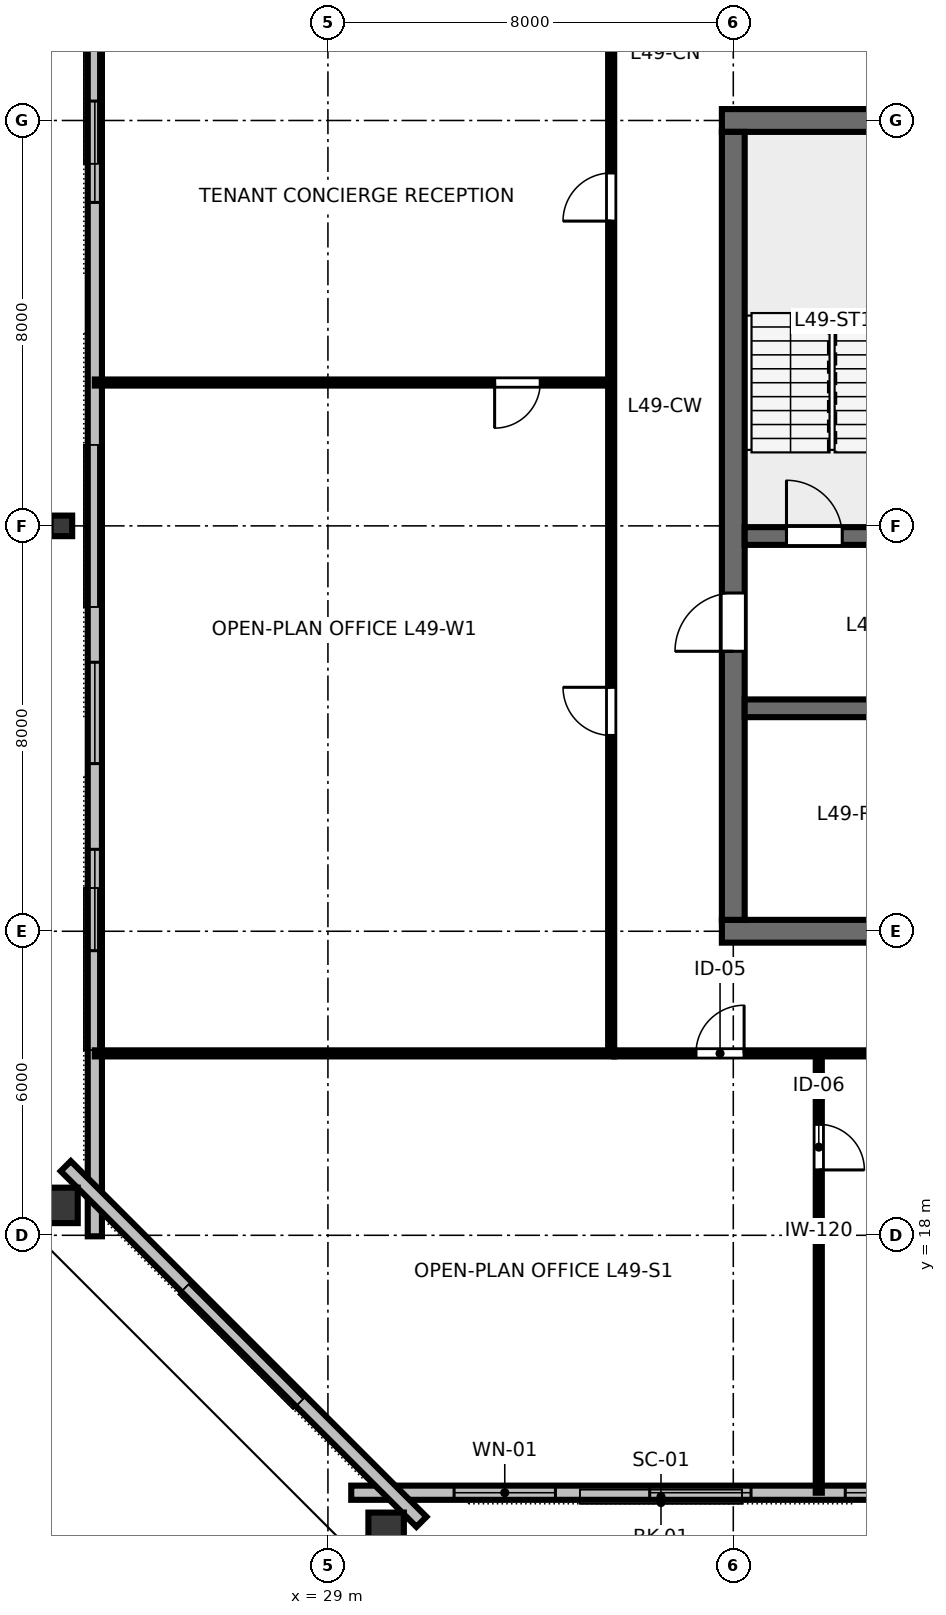
"""IFC4 building model, lengths in metres.
Left out: names, types, materials, properties, quantities, classifications, styles, units other than length and angle.
Written with IfcOpenShell. Run it as: python <this file> out.ifc"""

import sys

from ifc_helpers import new_model, si_unit, direction, frame, frame_2d, origin, origin_2d, place, context, subcontext, project, spatial, rectangle, hollow_rectangle, i_section, extrude, element, fill, save


model = new_model("IFC4")
c1 = context("Model", 3, precision=1e-05, world=origin(), true_north=direction((0.0, 1.0)))
c2 = subcontext(c1, "Body", "Model", "MODEL_VIEW")
j1 = project(units=[si_unit("LENGTHUNIT", "METRE"), si_unit("PLANEANGLEUNIT", "RADIAN")], contexts=[c1])
p1 = place(None, origin())
s1 = spatial("IfcSite", under=j1, at=p1, CompositionType="ELEMENT")
p2 = place(p1, origin())
s2 = spatial("IfcBuilding", under=s1, at=p2, CompositionType="ELEMENT")
p3 = place(p2, frame((0.0, 0.0, 187.8)))
s3 = spatial("IfcBuildingStorey", under=s2, at=p3, CompositionType="ELEMENT", Elevation=187.8)
p4 = place(p3, frame((36.775, 24.0, 0.0), z_axis=(0.0, 0.0, 1.0), x_axis=(1.0, 0.0, 0.0)))
e1 = element("IfcWall", 1, at=p4, inside=s3, PredefinedType="SHEAR", context=c2, shape_type="SweptSolid", body=[
    extrude(rectangle(XDim=18.45, YDim=0.45, at=frame_2d((9.225, 0.0))), origin(), (0.0, 0.0, 1.0), 3.36),
])
p5 = place(p4, frame((13.425, 0.0, 0.0)))
e2 = element("IfcOpeningElement", 2, at=p5, cuts=e1, PredefinedType="OPENING", context=c2, shape_type="SweptSolid", body=[
    extrude(rectangle(XDim=1.6, YDim=2.15, at=frame_2d((0.8, 1.075))), frame((0.0, 0.235, 0.0), z_axis=(0.0, -1.0, 0.0), x_axis=(1.0, 0.0, 0.0)), (0.0, 0.0, 1.0), 0.47),
])
p6 = place(p3, frame((36.775, 40.0, 0.0), z_axis=(0.0, 0.0, 1.0), x_axis=(1.0, 0.0, 0.0)))
e3 = element("IfcWall", 3, at=p6, inside=s3, PredefinedType="SHEAR", context=c2, shape_type="SweptSolid", body=[
    extrude(rectangle(XDim=18.45, YDim=0.45, at=frame_2d((9.225, 0.0))), origin(), (0.0, 0.0, 1.0), 3.36),
])
p7 = place(p6, frame((8.725, 0.0, 0.0)))
e4 = element("IfcOpeningElement", 4, at=p7, cuts=e3, PredefinedType="OPENING", context=c2, shape_type="SweptSolid", body=[
    extrude(rectangle(XDim=1.0, YDim=2.15, at=frame_2d((0.5, 1.075))), frame((0.0, 0.235, 0.0), z_axis=(0.0, -1.0, 0.0), x_axis=(1.0, 0.0, 0.0)), (0.0, 0.0, 1.0), 0.47),
])
p8 = place(p3, frame((37.0, 24.225, 0.0), z_axis=(0.0, 0.0, 1.0), x_axis=(0.0, 1.0, 0.0)))
e5 = element("IfcWall", 5, at=p8, inside=s3, PredefinedType="SHEAR", context=c2, shape_type="SweptSolid", body=[
    extrude(rectangle(XDim=15.55, YDim=0.45, at=frame_2d((7.775, 0.0))), origin(), (0.0, 0.0, 1.0), 3.36),
])
p9 = place(p8, frame((5.3, 0.0, 0.0)))
e6 = element("IfcOpeningElement", 6, at=p9, cuts=e5, PredefinedType="OPENING", context=c2, shape_type="SweptSolid", body=[
    extrude(rectangle(XDim=1.15, YDim=2.15, at=frame_2d((0.575, 1.075))), frame((0.0, 0.235, 0.0), z_axis=(0.0, -1.0, 0.0), x_axis=(1.0, 0.0, 0.0)), (0.0, 0.0, 1.0), 0.47),
])
p10 = place(p3, frame((37.225, 31.8, 0.0), z_axis=(0.0, 0.0, 1.0), x_axis=(1.0, 0.0, 0.0)))
e7 = element("IfcWall", 7, at=p10, inside=s3, PredefinedType="SHEAR", context=c2, shape_type="SweptSolid", body=[
    extrude(rectangle(XDim=17.55, YDim=0.35, at=frame_2d((8.775, 0.0))), origin(), (0.0, 0.0, 1.0), 3.36),
])
p11 = place(p10, frame((0.825, 0.0, 0.0)))
e8 = element("IfcOpeningElement", 8, at=p11, cuts=e7, PredefinedType="OPENING", context=c2, shape_type="SweptSolid", body=[
    extrude(rectangle(XDim=1.1, YDim=2.15, at=frame_2d((0.55, 1.075))), frame((0.0, 0.185, 0.0), z_axis=(0.0, -1.0, 0.0), x_axis=(1.0, 0.0, 0.0)), (0.0, 0.0, 1.0), 0.37),
])
p12 = place(p10, frame((14.725, 0.0, 0.0)))
e9 = element("IfcOpeningElement", 9, at=p12, cuts=e7, PredefinedType="OPENING", context=c2, shape_type="SweptSolid", body=[
    extrude(rectangle(XDim=1.1, YDim=2.15, at=frame_2d((0.55, 1.075))), frame((0.0, 0.185, 0.0), z_axis=(0.0, -1.0, 0.0), x_axis=(1.0, 0.0, 0.0)), (0.0, 0.0, 1.0), 0.37),
])
p13 = place(p3, frame((37.225, 28.4, 0.0), z_axis=(0.0, 0.0, 1.0), x_axis=(1.0, 0.0, 0.0)))
e10 = element("IfcWall", 10, at=p13, inside=s3, PredefinedType="SHEAR", context=c2, shape_type="SweptSolid", body=[
    extrude(rectangle(XDim=17.55, YDim=0.35, at=frame_2d((8.775, 0.0))), origin(), (0.0, 0.0, 1.0), 3.36),
])
p14 = place(p3, frame((30.149, 12.103, 0.0), z_axis=(0.0, 0.0, 1.0), x_axis=(1.0, 0.0, 0.0)))
e11 = element("IfcColumn", 11, at=p14, inside=s3, PredefinedType="COLUMN", context=c2, shape_type="SweptSolid", body=[
    extrude(hollow_rectangle(XDim=0.7, YDim=0.85, WallThickness=0.04, at=origin_2d()), origin(), (0.0, 0.0, 1.0), 3.373),
])
p15 = place(p3, frame((23.74, 32.0, 0.0), z_axis=(0.0, 0.0, 1.0), x_axis=(0.0, 1.0, 0.0)))
e12 = element("IfcColumn", 12, at=p15, inside=s3, PredefinedType="COLUMN", context=c2, shape_type="SweptSolid", body=[
    extrude(i_section(OverallWidth=0.406, OverallDepth=0.425, WebThickness=0.033, FlangeThickness=0.052, FilletRadius=0.025, at=origin_2d()), origin(), (0.0, 0.0, 1.0), 3.373),
])
p16 = place(p3, frame((23.637, 18.59, 0.0), z_axis=(0.0, 0.0, 1.0), x_axis=(0.0, 1.0, 0.0)))
e13 = element("IfcColumn", 13, at=p16, inside=s3, PredefinedType="COLUMN", context=c2, shape_type="SweptSolid", body=[
    extrude(hollow_rectangle(XDim=0.7, YDim=0.85, WallThickness=0.04, at=origin_2d()), origin(), (0.0, 0.0, 1.0), 3.373),
])
p17 = place(p3, frame((29.46, 12.92, 0.0), z_axis=(0.0, 0.0, 1.0), x_axis=(1.0, 0.0, 0.0)))
e14 = element("IfcWall", 14, at=p17, inside=s3, PredefinedType="STANDARD", context=c2, shape_type="SweptSolid", body=[
    extrude(rectangle(XDim=33.08, YDim=0.28, at=frame_2d((16.54, 0.0))), origin(), (0.0, 0.0, 1.0), 3.375),
])
p18 = place(p17, frame((18.665, 0.0, 0.0)))
e15 = element("IfcOpeningElement", 15, at=p18, cuts=e14, PredefinedType="OPENING", context=c2, shape_type="SweptSolid", body=[
    extrude(rectangle(XDim=1.4, YDim=2.15, at=frame_2d((0.7, 1.075))), frame((0.0, 0.15, 0.0), z_axis=(0.0, -1.0, 0.0), x_axis=(1.0, 0.0, 0.0)), (0.0, 0.0, 1.0), 0.3),
])
p19 = place(p17, frame((2.03, 0.0, 0.8)))
e16 = element("IfcOpeningElement", 16, at=p19, cuts=e14, PredefinedType="OPENING", context=c2, shape_type="SweptSolid", body=[
    extrude(rectangle(XDim=2.0, YDim=1.95, at=frame_2d((1.0, 0.975))), frame((0.0, 0.15, 0.0), z_axis=(0.0, -1.0, 0.0), x_axis=(1.0, 0.0, 0.0)), (0.0, 0.0, 1.0), 0.3),
])
p20 = place(p17, frame((5.89, 0.0, 0.8)))
e17 = element("IfcOpeningElement", 17, at=p20, cuts=e14, PredefinedType="OPENING", context=c2, shape_type="SweptSolid", body=[
    extrude(rectangle(XDim=2.0, YDim=1.95, at=frame_2d((1.0, 0.975))), frame((0.0, 0.15, 0.0), z_axis=(0.0, -1.0, 0.0), x_axis=(1.0, 0.0, 0.0)), (0.0, 0.0, 1.0), 0.3),
])
p21 = place(p17, frame((9.75, 0.0, 0.8)))
e18 = element("IfcOpeningElement", 18, at=p21, cuts=e14, PredefinedType="OPENING", context=c2, shape_type="SweptSolid", body=[
    extrude(rectangle(XDim=2.0, YDim=1.95, at=frame_2d((1.0, 0.975))), frame((0.0, 0.15, 0.0), z_axis=(0.0, -1.0, 0.0), x_axis=(1.0, 0.0, 0.0)), (0.0, 0.0, 1.0), 0.3),
])
p22 = place(p17, frame((21.33, 0.0, 0.8)))
e19 = element("IfcOpeningElement", 19, at=p22, cuts=e14, PredefinedType="OPENING", context=c2, shape_type="SweptSolid", body=[
    extrude(rectangle(XDim=2.0, YDim=1.95, at=frame_2d((1.0, 0.975))), frame((0.0, 0.15, 0.0), z_axis=(0.0, -1.0, 0.0), x_axis=(1.0, 0.0, 0.0)), (0.0, 0.0, 1.0), 0.3),
])
p23 = place(p17, frame((25.19, 0.0, 0.8)))
e20 = element("IfcOpeningElement", 20, at=p23, cuts=e14, PredefinedType="OPENING", context=c2, shape_type="SweptSolid", body=[
    extrude(rectangle(XDim=2.0, YDim=1.95, at=frame_2d((1.0, 0.975))), frame((0.0, 0.15, 0.0), z_axis=(0.0, -1.0, 0.0), x_axis=(1.0, 0.0, 0.0)), (0.0, 0.0, 1.0), 0.3),
])
p24 = place(p17, frame((29.05, 0.0, 0.8)))
e21 = element("IfcOpeningElement", 21, at=p24, cuts=e14, PredefinedType="OPENING", context=c2, shape_type="SweptSolid", body=[
    extrude(rectangle(XDim=2.0, YDim=1.95, at=frame_2d((1.0, 0.975))), frame((0.0, 0.15, 0.0), z_axis=(0.0, -1.0, 0.0), x_axis=(1.0, 0.0, 0.0)), (0.0, 0.0, 1.0), 0.3),
])
p25 = place(p3, frame((24.4, 46.02, 0.0), z_axis=(0.0, 0.0, 1.0), x_axis=(0.0, -1.0, 0.0)))
e22 = element("IfcWall", 22, at=p25, inside=s3, PredefinedType="STANDARD", context=c2, shape_type="SweptSolid", body=[
    extrude(rectangle(XDim=28.04, YDim=0.28, at=frame_2d((14.02, 0.0))), origin(), (0.0, 0.0, 1.0), 3.375),
])
p26 = place(p25, frame((5.637, 0.0, 0.8)))
e23 = element("IfcOpeningElement", 23, at=p26, cuts=e22, PredefinedType="OPENING", context=c2, shape_type="SweptSolid", body=[
    extrude(rectangle(XDim=2.0, YDim=1.95, at=frame_2d((1.0, 0.975))), frame((0.0, 0.15, 0.0), z_axis=(0.0, -1.0, 0.0), x_axis=(1.0, 0.0, 0.0)), (0.0, 0.0, 1.0), 0.3),
])
p27 = place(p25, frame((16.711, 0.0, 0.8)))
e24 = element("IfcOpeningElement", 24, at=p27, cuts=e22, PredefinedType="OPENING", context=c2, shape_type="SweptSolid", body=[
    extrude(rectangle(XDim=2.0, YDim=1.95, at=frame_2d((1.0, 0.975))), frame((0.0, 0.15, 0.0), z_axis=(0.0, -1.0, 0.0), x_axis=(1.0, 0.0, 0.0)), (0.0, 0.0, 1.0), 0.3),
])
p28 = place(p25, frame((20.403, 0.0, 0.8)))
e25 = element("IfcOpeningElement", 25, at=p28, cuts=e22, PredefinedType="OPENING", context=c2, shape_type="SweptSolid", body=[
    extrude(rectangle(XDim=2.0, YDim=1.95, at=frame_2d((1.0, 0.975))), frame((0.0, 0.15, 0.0), z_axis=(0.0, -1.0, 0.0), x_axis=(1.0, 0.0, 0.0)), (0.0, 0.0, 1.0), 0.3),
])
p29 = place(p3, frame((23.826, 19.365, 0.0), z_axis=(0.0, 0.0, 1.0), x_axis=(0.707106781187, -0.707106781187, 0.0)))
e26 = element("IfcWall", 26, at=p29, inside=s3, PredefinedType="STANDARD", context=c2, shape_type="SweptSolid", body=[
    extrude(rectangle(XDim=9.927, YDim=0.28, at=frame_2d((4.963, 0.0))), origin(), (0.0, 0.0, 1.0), 3.375),
])
p30 = place(p3, frame((38.687, 21.59, 0.0), z_axis=(0.0, 0.0, 1.0), x_axis=(0.0, -1.0, 0.0)))
e27 = element("IfcWall", 27, at=p30, inside=s3, PredefinedType="PARTITIONING", context=c2, shape_type="SweptSolid", body=[
    extrude(rectangle(XDim=8.67, YDim=0.12, at=frame_2d((4.335, 0.0))), origin(), (0.0, 0.0, 1.0), 2.655),
])
p31 = place(p30, frame((1.4, 0.0, 0.0)))
e28 = element("IfcOpeningElement", 28, at=p31, cuts=e27, PredefinedType="OPENING", context=c2, shape_type="SweptSolid", body=[
    extrude(rectangle(XDim=0.9, YDim=2.15, at=frame_2d((0.45, 1.075))), frame((0.0, 0.07, 0.0), z_axis=(0.0, -1.0, 0.0), x_axis=(1.0, 0.0, 0.0)), (0.0, 0.0, 1.0), 0.14),
])
p32 = place(p3, frame((34.65, 21.59, 0.0), z_axis=(0.0, 0.0, 1.0), x_axis=(1.0, 0.0, 0.0)))
e29 = element("IfcWall", 29, at=p32, inside=s3, PredefinedType="PARTITIONING", context=c2, shape_type="SweptSolid", body=[
    extrude(rectangle(XDim=10.33, YDim=0.12, at=frame_2d((5.165, 0.0))), origin(), (0.0, 0.0, 1.0), 2.655),
])
p33 = place(p32, frame((1.614, 0.0, 0.0)))
e30 = element("IfcOpeningElement", 30, at=p33, cuts=e29, PredefinedType="OPENING", context=c2, shape_type="SweptSolid", body=[
    extrude(rectangle(XDim=0.95, YDim=2.15, at=frame_2d((0.475, 1.075))), frame((0.0, 0.07, 0.0), z_axis=(0.0, -1.0, 0.0), x_axis=(1.0, 0.0, 0.0)), (0.0, 0.0, 1.0), 0.14),
])
p34 = place(p32, frame((6.306, 0.0, 0.0)))
e31 = element("IfcOpeningElement", 31, at=p34, cuts=e29, PredefinedType="OPENING", context=c2, shape_type="SweptSolid", body=[
    extrude(rectangle(XDim=0.95, YDim=2.15, at=frame_2d((0.475, 1.075))), frame((0.0, 0.07, 0.0), z_axis=(0.0, -1.0, 0.0), x_axis=(1.0, 0.0, 0.0)), (0.0, 0.0, 1.0), 0.14),
])
p35 = place(p3, frame((34.59, 34.829, 0.0), z_axis=(0.0, 0.0, 1.0), x_axis=(-1.0, 0.0, 0.0)))
e32 = element("IfcWall", 32, at=p35, inside=s3, PredefinedType="PARTITIONING", context=c2, shape_type="SweptSolid", body=[
    extrude(rectangle(XDim=10.19, YDim=0.12, at=frame_2d((5.095, 0.0))), origin(), (0.0, 0.0, 1.0), 2.655),
])
p36 = place(p35, frame((1.4, 0.0, 0.0)))
e33 = element("IfcOpeningElement", 33, at=p36, cuts=e32, PredefinedType="OPENING", context=c2, shape_type="SweptSolid", body=[
    extrude(rectangle(XDim=0.9, YDim=2.15, at=frame_2d((0.45, 1.075))), frame((0.0, 0.07, 0.0), z_axis=(0.0, -1.0, 0.0), x_axis=(1.0, 0.0, 0.0)), (0.0, 0.0, 1.0), 0.14),
])
p37 = place(p3, frame((34.59, 21.65, 0.0), z_axis=(0.0, 0.0, 1.0), x_axis=(0.0, 1.0, 0.0)))
e34 = element("IfcWall", 34, at=p37, inside=s3, PredefinedType="PARTITIONING", context=c2, shape_type="SweptSolid", body=[
    extrude(rectangle(XDim=20.7, YDim=0.12, at=frame_2d((10.35, 0.0))), origin(), (0.0, 0.0, 1.0), 2.655),
])
p38 = place(p37, frame((6.214, 0.0, 0.0)))
e35 = element("IfcOpeningElement", 35, at=p38, cuts=e34, PredefinedType="OPENING", context=c2, shape_type="SweptSolid", body=[
    extrude(rectangle(XDim=0.95, YDim=2.15, at=frame_2d((0.475, 1.075))), frame((0.0, 0.07, 0.0), z_axis=(0.0, -1.0, 0.0), x_axis=(1.0, 0.0, 0.0)), (0.0, 0.0, 1.0), 0.14),
])
p39 = place(p37, frame((16.365, 0.0, 0.0)))
e36 = element("IfcOpeningElement", 36, at=p39, cuts=e34, PredefinedType="OPENING", context=c2, shape_type="SweptSolid", body=[
    extrude(rectangle(XDim=0.95, YDim=2.15, at=frame_2d((0.475, 1.075))), frame((0.0, 0.07, 0.0), z_axis=(0.0, -1.0, 0.0), x_axis=(1.0, 0.0, 0.0)), (0.0, 0.0, 1.0), 0.14),
])
p40 = place(p3, frame((34.65, 21.59, 0.0), z_axis=(0.0, 0.0, 1.0), x_axis=(-1.0, 0.0, 0.0)))
e37 = element("IfcWall", 37, at=p40, inside=s3, PredefinedType="PARTITIONING", context=c2, shape_type="SweptSolid", body=[
    extrude(rectangle(XDim=10.25, YDim=0.12, at=frame_2d((5.125, 0.0))), origin(), (0.0, 0.0, 1.0), 2.655),
])
p41 = place(p19, origin())
e38 = element("IfcWindow", 38, at=p41, inside=s3, PartitioningType="SINGLE_PANEL", PredefinedType="WINDOW", context=c2, shape_type="SweptSolid", body=[
    extrude(rectangle(XDim=2.0, YDim=1.95, at=frame_2d((1.0, 0.975))), frame((0.0, 0.03, 0.0), z_axis=(0.0, -1.0, 0.0), x_axis=(1.0, 0.0, 0.0)), (0.0, 0.0, 1.0), 0.06),
])
fill(e16, e38)
p42 = place(p20, origin())
e39 = element("IfcWindow", 39, at=p42, inside=s3, PartitioningType="SINGLE_PANEL", PredefinedType="WINDOW", context=c2, shape_type="SweptSolid", body=[
    extrude(rectangle(XDim=2.0, YDim=1.95, at=frame_2d((1.0, 0.975))), frame((0.0, 0.03, 0.0), z_axis=(0.0, -1.0, 0.0), x_axis=(1.0, 0.0, 0.0)), (0.0, 0.0, 1.0), 0.06),
])
fill(e17, e39)
p43 = place(p21, origin())
e40 = element("IfcWindow", 40, at=p43, inside=s3, PartitioningType="SINGLE_PANEL", PredefinedType="WINDOW", context=c2, shape_type="SweptSolid", body=[
    extrude(rectangle(XDim=2.0, YDim=1.95, at=frame_2d((1.0, 0.975))), frame((0.0, 0.03, 0.0), z_axis=(0.0, -1.0, 0.0), x_axis=(1.0, 0.0, 0.0)), (0.0, 0.0, 1.0), 0.06),
])
fill(e18, e40)
p44 = place(p26, origin())
e41 = element("IfcWindow", 41, at=p44, inside=s3, PartitioningType="SINGLE_PANEL", PredefinedType="WINDOW", context=c2, shape_type="SweptSolid", body=[
    extrude(rectangle(XDim=2.0, YDim=1.95, at=frame_2d((1.0, 0.975))), frame((0.0, 0.03, 0.0), z_axis=(0.0, -1.0, 0.0), x_axis=(1.0, 0.0, 0.0)), (0.0, 0.0, 1.0), 0.06),
])
fill(e23, e41)
p45 = place(p27, origin())
e42 = element("IfcWindow", 42, at=p45, inside=s3, PartitioningType="SINGLE_PANEL", PredefinedType="WINDOW", context=c2, shape_type="SweptSolid", body=[
    extrude(rectangle(XDim=2.0, YDim=1.95, at=frame_2d((1.0, 0.975))), frame((0.0, 0.03, 0.0), z_axis=(0.0, -1.0, 0.0), x_axis=(1.0, 0.0, 0.0)), (0.0, 0.0, 1.0), 0.06),
])
fill(e24, e42)
p46 = place(p28, origin())
e43 = element("IfcWindow", 43, at=p46, inside=s3, PartitioningType="SINGLE_PANEL", PredefinedType="WINDOW", context=c2, shape_type="SweptSolid", body=[
    extrude(rectangle(XDim=2.0, YDim=1.95, at=frame_2d((1.0, 0.975))), frame((0.0, 0.03, 0.0), z_axis=(0.0, -1.0, 0.0), x_axis=(1.0, 0.0, 0.0)), (0.0, 0.0, 1.0), 0.06),
])
fill(e25, e43)
p47 = place(p11, origin())
e44 = element("IfcDoor", 44, at=p47, inside=s3, OperationType="SINGLE_SWING_LEFT", PredefinedType="DOOR", context=c2, shape_type="SweptSolid", body=[
    extrude(rectangle(XDim=1.1, YDim=2.15, at=frame_2d((0.55, 1.075))), frame((0.0, 0.025, 0.0), z_axis=(0.0, -1.0, 0.0), x_axis=(1.0, 0.0, 0.0)), (0.0, 0.0, 1.0), 0.05),
])
fill(e8, e44)
p48 = place(p9, origin())
e45 = element("IfcDoor", 45, at=p48, inside=s3, OperationType="SINGLE_SWING_LEFT", PredefinedType="DOOR", context=c2, shape_type="SweptSolid", body=[
    extrude(rectangle(XDim=1.15, YDim=2.15, at=frame_2d((0.575, 1.075))), frame((0.0, 0.025, 0.0), z_axis=(0.0, -1.0, 0.0), x_axis=(1.0, 0.0, 0.0)), (0.0, 0.0, 1.0), 0.05),
])
fill(e6, e45)
p49 = place(p31, origin())
e46 = element("IfcDoor", 46, at=p49, inside=s3, OperationType="SINGLE_SWING_RIGHT", PredefinedType="DOOR", context=c2, shape_type="SweptSolid", body=[
    extrude(rectangle(XDim=0.9, YDim=2.15, at=frame_2d((0.45, 1.075))), frame((0.0, 0.025, 0.0), z_axis=(0.0, -1.0, 0.0), x_axis=(1.0, 0.0, 0.0)), (0.0, 0.0, 1.0), 0.05),
])
fill(e28, e46)
p50 = place(p33, origin())
e47 = element("IfcDoor", 47, at=p50, inside=s3, OperationType="SINGLE_SWING_RIGHT", PredefinedType="DOOR", context=c2, shape_type="SweptSolid", body=[
    extrude(rectangle(XDim=0.95, YDim=2.15, at=frame_2d((0.475, 1.075))), frame((0.0, 0.025, 0.0), z_axis=(0.0, -1.0, 0.0), x_axis=(1.0, 0.0, 0.0)), (0.0, 0.0, 1.0), 0.05),
])
fill(e30, e47)
p51 = place(p36, origin())
e48 = element("IfcDoor", 48, at=p51, inside=s3, OperationType="SINGLE_SWING_RIGHT", PredefinedType="DOOR", context=c2, shape_type="SweptSolid", body=[
    extrude(rectangle(XDim=0.9, YDim=2.15, at=frame_2d((0.45, 1.075))), frame((0.0, 0.025, 0.0), z_axis=(0.0, -1.0, 0.0), x_axis=(1.0, 0.0, 0.0)), (0.0, 0.0, 1.0), 0.05),
])
fill(e33, e48)
p52 = place(p38, origin())
e49 = element("IfcDoor", 49, at=p52, inside=s3, OperationType="SINGLE_SWING_RIGHT", PredefinedType="DOOR", context=c2, shape_type="SweptSolid", body=[
    extrude(rectangle(XDim=0.95, YDim=2.15, at=frame_2d((0.475, 1.075))), frame((0.0, 0.025, 0.0), z_axis=(0.0, -1.0, 0.0), x_axis=(1.0, 0.0, 0.0)), (0.0, 0.0, 1.0), 0.05),
])
fill(e35, e49)
p53 = place(p39, origin())
e50 = element("IfcDoor", 50, at=p53, inside=s3, OperationType="SINGLE_SWING_LEFT", PredefinedType="DOOR", context=c2, shape_type="SweptSolid", body=[
    extrude(rectangle(XDim=0.95, YDim=2.15, at=frame_2d((0.475, 1.075))), frame((0.0, 0.025, 0.0), z_axis=(0.0, -1.0, 0.0), x_axis=(1.0, 0.0, 0.0)), (0.0, 0.0, 1.0), 0.05),
])
fill(e36, e50)
save(model, sys.argv[1])
